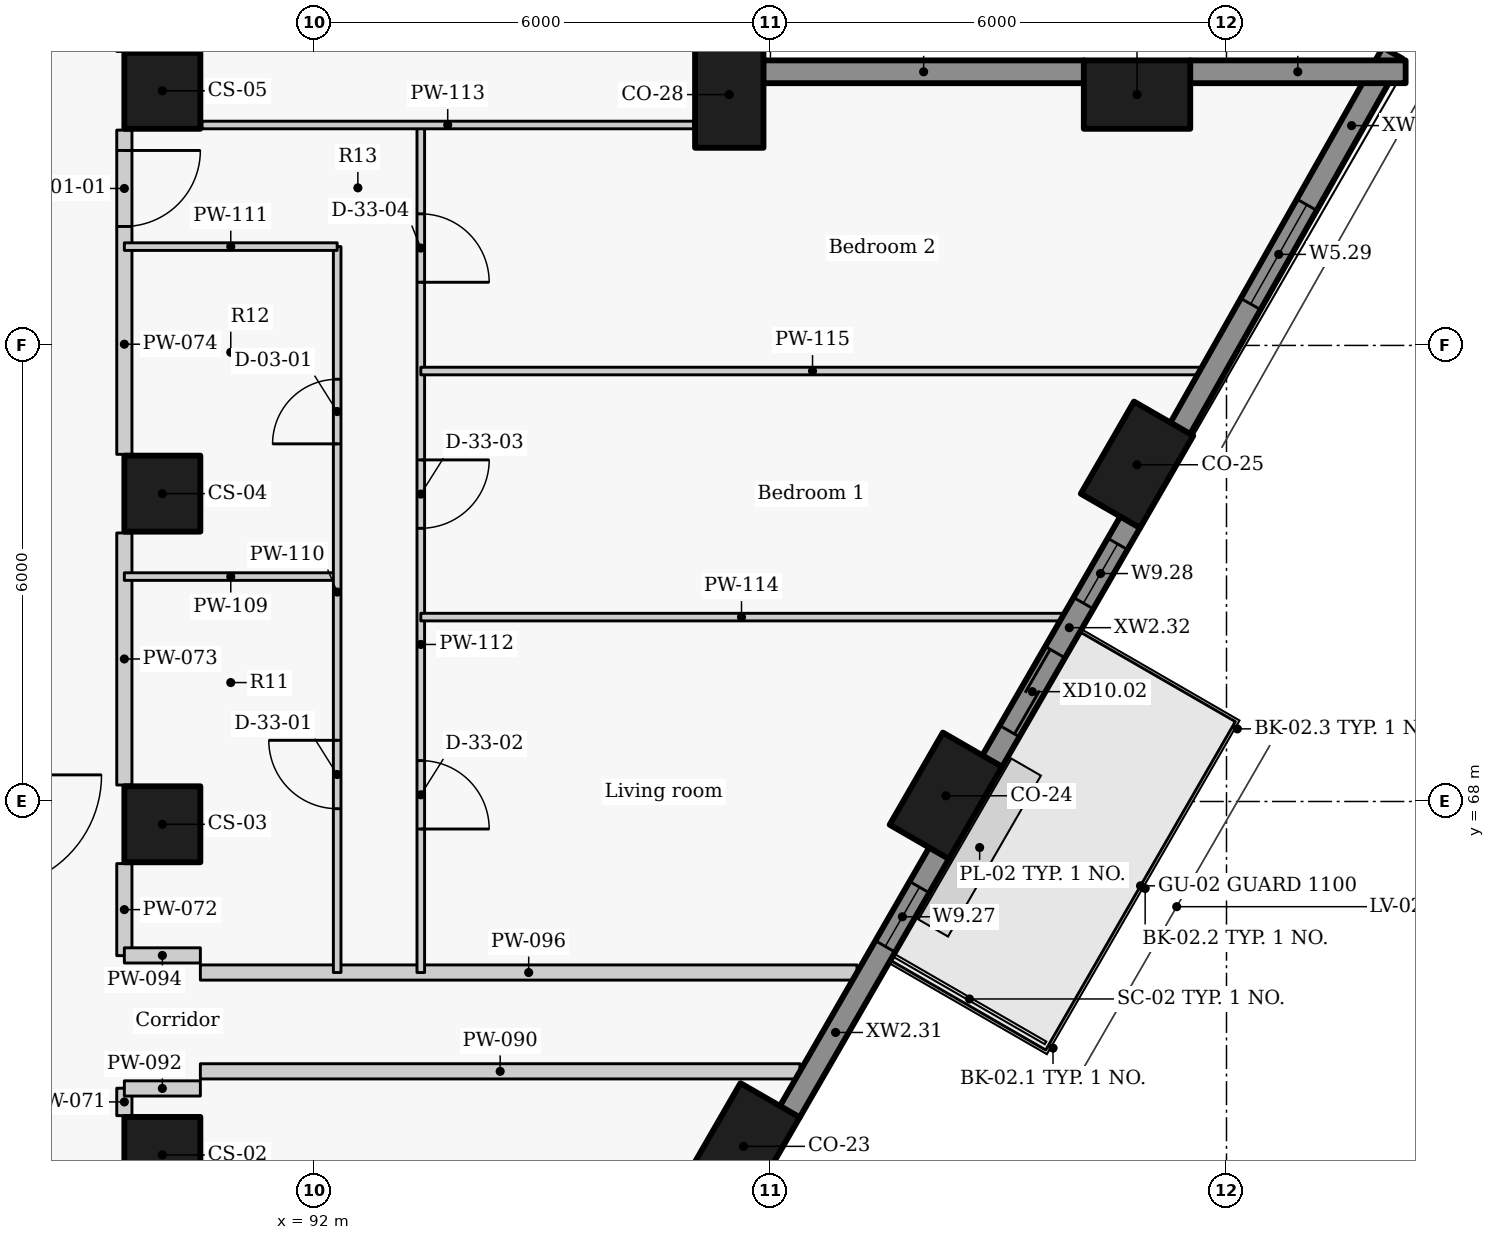
"""IFC4 building model, lengths in metres.
Left out: names, types, materials, properties, quantities, classifications, styles, units other than length and angle.
Written with IfcOpenShell. Run it as: python <this file> out.ifc"""

import sys

from ifc_helpers import new_model, si_unit, direction, frame, frame_2d, origin, origin_2d, place, context, subcontext, project, spatial, rectangle, extrude, element, fill, save


model = new_model("IFC4")
c1 = context("Model", 3, precision=1e-05, world=origin(), true_north=direction((0.0, 1.0)))
c2 = subcontext(c1, "Body", "Model", "MODEL_VIEW")
j1 = project(units=[si_unit("LENGTHUNIT", "METRE"), si_unit("PLANEANGLEUNIT", "RADIAN")], contexts=[c1])
p1 = place(None, origin())
s1 = spatial("IfcSite", under=j1, at=p1, CompositionType="ELEMENT")
p2 = place(p1, origin())
s2 = spatial("IfcBuilding", under=s1, at=p2, CompositionType="ELEMENT")
p3 = place(p2, frame((0.0, 0.0, 107.4)))
s3 = spatial("IfcBuildingStorey", under=s2, at=p3, CompositionType="ELEMENT", Elevation=107.4)
for number, where, z_axis, x_axis in (
    (1, (97.646, 63.463, 0.0), (0.0, 0.0, 1.0), (0.5, 0.866, 0.0)),
    (2, (100.308, 68.075, 0.0), (0.0, 0.0, 1.0), (0.5, 0.866, 0.0)),
    (3, (102.823, 72.43, 0.0), (0.0, 0.0, 1.0), (0.5, 0.866, 0.0)),
    (4, (102.823, 77.3, 0.0), (0.0, 0.0, 1.0), (-1.0, 0.0, 0.0)),
    (5, (97.458, 77.3, 0.0), (0.0, 0.0, 1.0), (0.0, 1.0, 0.0)),
):
    element("IfcColumn", number, at=place(p3, frame(where, z_axis=z_axis, x_axis=x_axis)), inside=s3, PredefinedType="COLUMN", context=c2, shape_type="SweptSolid", body=[
        extrude(rectangle(XDim=1.4, YDim=0.9, at=origin_2d()), origin(), (0.0, 0.0, 1.0), 3.3),
    ])
for number, where, z_axis, x_axis in (
    (6, (90.0, 63.35, 0.0), (0.0, 0.0, 1.0), (0.0, 1.0, 0.0)),
    (7, (90.0, 67.7, 0.0), (0.0, 0.0, 1.0), (0.0, 1.0, 0.0)),
    (8, (90.0, 72.05, 0.0), (0.0, 0.0, 1.0), (0.0, 1.0, 0.0)),
    (9, (90.0, 77.35, 0.0), (0.0, 0.0, 1.0), (0.0, 1.0, 0.0)),
):
    element("IfcColumn", number, at=place(p3, frame(where, z_axis=z_axis, x_axis=x_axis)), inside=s3, PredefinedType="COLUMN", context=c2, shape_type="SweptSolid", body=[
        extrude(rectangle(XDim=1.0, YDim=1.0, at=origin_2d()), origin(), (0.0, 0.0, 1.0), 3.3),
    ])
p4 = place(p3, frame((98.253, 63.916, 0.0), z_axis=(0.0, 0.0, 1.0), x_axis=(0.499957037901, 0.866050206543, 0.0)))
e10 = element("IfcWall", 10, at=p4, inside=s3, PredefinedType="SOLIDWALL", context=c2, shape_type="SweptSolid", body=[
    extrude(rectangle(XDim=3.934, YDim=0.3, at=frame_2d((1.967, 0.0))), origin(), (0.0, 0.0, 1.0), 2.425),
])
p5 = place(p4, frame((2.515, 0.0, 0.9)))
e11 = element("IfcOpeningElement", 11, at=p5, cuts=e10, PredefinedType="OPENING", context=c2, shape_type="SweptSolid", body=[
    extrude(rectangle(XDim=0.9, YDim=1.1, at=frame_2d((0.45, 0.55))), frame((0.0, 0.16, 0.0), z_axis=(0.0, -1.0, 0.0), x_axis=(1.0, 0.0, 0.0)), (0.0, 0.0, 1.0), 0.32),
])
p6 = place(p3, frame((100.916, 68.528, 0.0), z_axis=(0.0, 0.0, 1.0), x_axis=(0.500009139881, 0.866020126807, 0.0)))
e12 = element("IfcWall", 12, at=p6, inside=s3, PredefinedType="SOLIDWALL", context=c2, shape_type="SweptSolid", body=[
    extrude(rectangle(XDim=3.637, YDim=0.3, at=frame_2d((1.818, 0.0))), origin(), (0.0, 0.0, 1.0), 2.425),
])
p7 = place(p6, frame((0.458, 0.0, 0.0)))
e13 = element("IfcOpeningElement", 13, at=p7, cuts=e12, PredefinedType="OPENING", context=c2, shape_type="SweptSolid", body=[
    extrude(rectangle(XDim=1.2, YDim=2.0, at=frame_2d((0.6, 1.0))), frame((0.0, 0.16, 0.0), z_axis=(0.0, -1.0, 0.0), x_axis=(1.0, 0.0, 0.0)), (0.0, 0.0, 1.0), 0.32),
])
p8 = place(p6, frame((2.403, 0.0, 0.9)))
e14 = element("IfcOpeningElement", 14, at=p8, cuts=e12, PredefinedType="OPENING", context=c2, shape_type="SweptSolid", body=[
    extrude(rectangle(XDim=0.9, YDim=1.1, at=frame_2d((0.45, 0.55))), frame((0.0, 0.16, 0.0), z_axis=(0.0, -1.0, 0.0), x_axis=(1.0, 0.0, 0.0)), (0.0, 0.0, 1.0), 0.32),
])
p9 = place(p3, frame((103.391, 72.906, 0.0), z_axis=(0.0, 0.0, 1.0), x_axis=(0.492456858874, 0.870336855561, 0.0)))
e15 = element("IfcWall", 15, at=p9, inside=s3, PredefinedType="SOLIDWALL", context=c2, shape_type="SweptSolid", body=[
    extrude(rectangle(XDim=5.677, YDim=0.3, at=frame_2d((2.838, 0.0))), origin(), (0.0, 0.0, 1.0), 2.425),
])
p10 = place(p9, frame((1.883, 0.0, 0.9)))
e16 = element("IfcOpeningElement", 16, at=p10, cuts=e15, PredefinedType="OPENING", context=c2, shape_type="SweptSolid", body=[
    extrude(rectangle(XDim=1.5, YDim=1.1, at=frame_2d((0.75, 0.55))), frame((0.0, 0.16, 0.0), z_axis=(0.0, -1.0, 0.0), x_axis=(1.0, 0.0, 0.0)), (0.0, 0.0, 1.0), 0.32),
])
p11 = place(p3, frame((106.357, 77.6, 0.0), z_axis=(0.0, 0.0, 1.0), x_axis=(-1.0, 0.0, 0.0)))
e17 = element("IfcWall", 17, at=p11, inside=s3, PredefinedType="SOLIDWALL", context=c2, shape_type="SweptSolid", body=[
    extrude(rectangle(XDim=2.838, YDim=0.3, at=frame_2d((1.419, 0.0))), origin(), (0.0, 0.0, 1.0), 2.425),
])
p12 = place(p3, frame((102.127, 77.6, 0.0), z_axis=(0.0, 0.0, 1.0), x_axis=(-1.0, 0.0, 0.0)))
e18 = element("IfcWall", 18, at=p12, inside=s3, PredefinedType="SOLIDWALL", context=c2, shape_type="SweptSolid", body=[
    extrude(rectangle(XDim=4.223, YDim=0.3, at=frame_2d((2.111, 0.0))), origin(), (0.0, 0.0, 1.0), 2.425),
])
p13 = place(p3, frame((89.5, 63.867, 0.0), z_axis=(0.0, 0.0, 1.0), x_axis=(0.0, 1.0, 0.0)))
e19 = element("IfcWall", 19, at=p13, inside=s3, PredefinedType="PARTITIONING", context=c2, shape_type="SweptSolid", body=[
    extrude(rectangle(XDim=0.361, YDim=0.2, at=frame_2d((0.181, 0.0))), origin(), (0.0, 0.0, 1.0), 3.025),
])
p14 = place(p3, frame((89.5, 65.972, 0.0), z_axis=(0.0, 0.0, 1.0), x_axis=(0.0, 1.0, 0.0)))
e20 = element("IfcWall", 20, at=p14, inside=s3, PredefinedType="PARTITIONING", context=c2, shape_type="SweptSolid", body=[
    extrude(rectangle(XDim=1.211, YDim=0.2, at=frame_2d((0.605, 0.0))), origin(), (0.0, 0.0, 1.0), 3.025),
])
p15 = place(p3, frame((89.5, 68.217, 0.0), z_axis=(0.0, 0.0, 1.0), x_axis=(0.0, 1.0, 0.0)))
e21 = element("IfcWall", 21, at=p15, inside=s3, PredefinedType="PARTITIONING", context=c2, shape_type="SweptSolid", body=[
    extrude(rectangle(XDim=3.316, YDim=0.2, at=frame_2d((1.658, 0.0))), origin(), (0.0, 0.0, 1.0), 3.025),
])
p16 = place(p3, frame((89.5, 76.833, 0.0), z_axis=(0.0, 0.0, 1.0), x_axis=(0.0, -1.0, 0.0)))
e22 = element("IfcWall", 22, at=p16, inside=s3, PredefinedType="PARTITIONING", context=c2, shape_type="SweptSolid", body=[
    extrude(rectangle(XDim=4.266, YDim=0.2, at=frame_2d((2.133, 0.0))), origin(), (0.0, 0.0, 1.0), 3.025),
])
p17 = place(p16, frame((0.268, 0.0, 0.0)))
e23 = element("IfcOpeningElement", 23, at=p17, cuts=e22, PredefinedType="OPENING", context=c2, shape_type="SweptSolid", body=[
    extrude(rectangle(XDim=1.0, YDim=2.1, at=frame_2d((0.5, 1.05))), frame((0.0, 0.11, 0.0), z_axis=(0.0, -1.0, 0.0), x_axis=(1.0, 0.0, 0.0)), (0.0, 0.0, 1.0), 0.22),
])
p18 = place(p3, frame((90.5, 64.45, 0.0), z_axis=(0.0, 0.0, 1.0), x_axis=(1.0, 0.0, 0.0)))
e24 = element("IfcWall", 24, at=p18, inside=s3, PredefinedType="PARTITIONING", context=c2, shape_type="SweptSolid", body=[
    extrude(rectangle(XDim=7.889, YDim=0.2, at=frame_2d((3.944, 0.0))), origin(), (0.0, 0.0, 1.0), 2.405),
])
for number, where, z_axis, x_axis in (
    (25, (89.5, 64.225, 0.0), (0.0, 0.0, 1.0), (1.0, 0.0, 0.0)),
    (26, (89.5, 65.975, 0.0), (0.0, 0.0, 1.0), (1.0, 0.0, 0.0)),
):
    element("IfcWall", number, at=place(p3, frame(where, z_axis=z_axis, x_axis=x_axis)), inside=s3, PredefinedType="PARTITIONING", context=c2, shape_type="SweptSolid", body=[
        extrude(rectangle(XDim=1.0, YDim=0.2, at=frame_2d((0.5, 0.0))), origin(), (0.0, 0.0, 1.0), 2.505),
    ])
p19 = place(p3, frame((90.5, 65.75, 0.0), z_axis=(0.0, 0.0, 1.0), x_axis=(1.0, 0.0, 0.0)))
e27 = element("IfcWall", 27, at=p19, inside=s3, PredefinedType="PARTITIONING", context=c2, shape_type="SweptSolid", body=[
    extrude(rectangle(XDim=8.639, YDim=0.2, at=frame_2d((4.32, 0.0))), origin(), (0.0, 0.0, 1.0), 2.405),
])
p20 = place(p3, frame((89.5, 70.959, 0.0), z_axis=(0.0, 0.0, 1.0), x_axis=(1.0, 0.0, 0.0)))
e28 = element("IfcWall", 28, at=p20, inside=s3, PredefinedType="PARTITIONING", context=c2, shape_type="SweptSolid", body=[
    extrude(rectangle(XDim=2.8, YDim=0.1, at=frame_2d((1.4, 0.0))), origin(), (0.0, 0.0, 1.0), 2.505),
])
p21 = place(p3, frame((92.3, 65.75, 0.0), z_axis=(0.0, 0.0, 1.0), x_axis=(0.0, 1.0, 0.0)))
e29 = element("IfcWall", 29, at=p21, inside=s3, PredefinedType="PARTITIONING", context=c2, shape_type="SweptSolid", body=[
    extrude(rectangle(XDim=9.55, YDim=0.1, at=frame_2d((4.775, 0.0))), origin(), (0.0, 0.0, 1.0), 3.025),
])
p22 = place(p21, frame((2.155, 0.0, 0.0)))
e30 = element("IfcOpeningElement", 30, at=p22, cuts=e29, PredefinedType="OPENING", context=c2, shape_type="SweptSolid", body=[
    extrude(rectangle(XDim=0.9, YDim=2.1, at=frame_2d((0.45, 1.05))), frame((0.0, 0.06, 0.0), z_axis=(0.0, -1.0, 0.0), x_axis=(1.0, 0.0, 0.0)), (0.0, 0.0, 1.0), 0.12),
])
p23 = place(p21, frame((6.955, 0.0, 0.0)))
e31 = element("IfcOpeningElement", 31, at=p23, cuts=e29, PredefinedType="OPENING", context=c2, shape_type="SweptSolid", body=[
    extrude(rectangle(XDim=0.85, YDim=2.1, at=frame_2d((0.425, 1.05))), frame((0.0, 0.06, 0.0), z_axis=(0.0, -1.0, 0.0), x_axis=(1.0, 0.0, 0.0)), (0.0, 0.0, 1.0), 0.12),
])
p24 = place(p3, frame((89.5, 75.3, 0.0), z_axis=(0.0, 0.0, 1.0), x_axis=(1.0, 0.0, 0.0)))
e32 = element("IfcWall", 32, at=p24, inside=s3, PredefinedType="PARTITIONING", context=c2, shape_type="SweptSolid", body=[
    extrude(rectangle(XDim=2.8, YDim=0.1, at=frame_2d((1.4, 0.0))), origin(), (0.0, 0.0, 1.0), 2.505),
])
p25 = place(p3, frame((93.4, 76.9, 0.0), z_axis=(0.0, 0.0, 1.0), x_axis=(0.0, -1.0, 0.0)))
e33 = element("IfcWall", 33, at=p25, inside=s3, PredefinedType="PARTITIONING", context=c2, shape_type="SweptSolid", body=[
    extrude(rectangle(XDim=11.15, YDim=0.1, at=frame_2d((5.575, 0.0))), origin(), (0.0, 0.0, 1.0), 3.025),
])
p26 = place(p25, frame((8.362, 0.0, 0.0)))
e34 = element("IfcOpeningElement", 34, at=p26, cuts=e33, PredefinedType="OPENING", context=c2, shape_type="SweptSolid", body=[
    extrude(rectangle(XDim=0.9, YDim=2.1, at=frame_2d((0.45, 1.05))), frame((0.0, 0.06, 0.0), z_axis=(0.0, -1.0, 0.0), x_axis=(1.0, 0.0, 0.0)), (0.0, 0.0, 1.0), 0.12),
])
p27 = place(p25, frame((4.406, 0.0, 0.0)))
e35 = element("IfcOpeningElement", 35, at=p27, cuts=e33, PredefinedType="OPENING", context=c2, shape_type="SweptSolid", body=[
    extrude(rectangle(XDim=0.9, YDim=2.1, at=frame_2d((0.45, 1.05))), frame((0.0, 0.06, 0.0), z_axis=(0.0, -1.0, 0.0), x_axis=(1.0, 0.0, 0.0)), (0.0, 0.0, 1.0), 0.12),
])
p28 = place(p25, frame((1.169, 0.0, 0.0)))
e36 = element("IfcOpeningElement", 36, at=p28, cuts=e33, PredefinedType="OPENING", context=c2, shape_type="SweptSolid", body=[
    extrude(rectangle(XDim=0.9, YDim=2.1, at=frame_2d((0.45, 1.05))), frame((0.0, 0.06, 0.0), z_axis=(0.0, -1.0, 0.0), x_axis=(1.0, 0.0, 0.0)), (0.0, 0.0, 1.0), 0.12),
])
p29 = place(p3, frame((90.52, 76.9, 0.0), z_axis=(0.0, 0.0, 1.0), x_axis=(1.0, 0.0, 0.0)))
e37 = element("IfcWall", 37, at=p29, inside=s3, PredefinedType="PARTITIONING", context=c2, shape_type="SweptSolid", body=[
    extrude(rectangle(XDim=6.468, YDim=0.1, at=frame_2d((3.234, 0.0))), origin(), (0.0, 0.0, 1.0), 3.025),
])
p30 = place(p3, frame((93.4, 70.426, 0.0), z_axis=(0.0, 0.0, 1.0), x_axis=(1.0, 0.0, 0.0)))
e38 = element("IfcWall", 38, at=p30, inside=s3, PredefinedType="PARTITIONING", context=c2, shape_type="SweptSolid", body=[
    extrude(rectangle(XDim=8.439, YDim=0.1, at=frame_2d((4.219, 0.0))), origin(), (0.0, 0.0, 1.0), 2.405),
])
p31 = place(p3, frame((93.4, 73.663, 0.0), z_axis=(0.0, 0.0, 1.0), x_axis=(1.0, 0.0, 0.0)))
e39 = element("IfcWall", 39, at=p31, inside=s3, PredefinedType="PARTITIONING", context=c2, shape_type="SweptSolid", body=[
    extrude(rectangle(XDim=10.308, YDim=0.1, at=frame_2d((5.154, 0.0))), origin(), (0.0, 0.0, 1.0), 2.405),
])
p32 = place(p5, origin())
e40 = element("IfcWindow", 40, at=p32, inside=s3, PartitioningType="SINGLE_PANEL", PredefinedType="WINDOW", context=c2, shape_type="SweptSolid", body=[
    extrude(rectangle(XDim=0.9, YDim=1.1, at=frame_2d((0.45, 0.55))), frame((0.0, 0.03, 0.0), z_axis=(0.0, -1.0, 0.0), x_axis=(1.0, 0.0, 0.0)), (0.0, 0.0, 1.0), 0.06),
])
fill(e11, e40)
p33 = place(p7, origin())
e41 = element("IfcDoor", 41, at=p33, inside=s3, OperationType="SLIDING_TO_LEFT", PredefinedType="DOOR", context=c2, shape_type="SweptSolid", body=[
    extrude(rectangle(XDim=1.2, YDim=2.0, at=frame_2d((0.6, 1.0))), frame((0.0, 0.025, 0.0), z_axis=(0.0, -1.0, 0.0), x_axis=(1.0, 0.0, 0.0)), (0.0, 0.0, 1.0), 0.05),
])
fill(e13, e41)
p34 = place(p8, origin())
e42 = element("IfcWindow", 42, at=p34, inside=s3, PartitioningType="SINGLE_PANEL", PredefinedType="WINDOW", context=c2, shape_type="SweptSolid", body=[
    extrude(rectangle(XDim=0.9, YDim=1.1, at=frame_2d((0.45, 0.55))), frame((0.0, 0.03, 0.0), z_axis=(0.0, -1.0, 0.0), x_axis=(1.0, 0.0, 0.0)), (0.0, 0.0, 1.0), 0.06),
])
fill(e14, e42)
p35 = place(p10, origin())
e43 = element("IfcWindow", 43, at=p35, inside=s3, PartitioningType="SINGLE_PANEL", PredefinedType="WINDOW", context=c2, shape_type="SweptSolid", body=[
    extrude(rectangle(XDim=1.5, YDim=1.1, at=frame_2d((0.75, 0.55))), frame((0.0, 0.03, 0.0), z_axis=(0.0, -1.0, 0.0), x_axis=(1.0, 0.0, 0.0)), (0.0, 0.0, 1.0), 0.06),
])
fill(e16, e43)
p36 = place(p17, origin())
e44 = element("IfcDoor", 44, at=p36, inside=s3, OperationType="SINGLE_SWING_LEFT", PredefinedType="DOOR", context=c2, shape_type="SweptSolid", body=[
    extrude(rectangle(XDim=1.0, YDim=2.1, at=frame_2d((0.5, 1.05))), frame((0.0, 0.025, 0.0), z_axis=(0.0, -1.0, 0.0), x_axis=(1.0, 0.0, 0.0)), (0.0, 0.0, 1.0), 0.05),
])
fill(e23, e44)
p37 = place(p22, origin())
e45 = element("IfcDoor", 45, at=p37, inside=s3, OperationType="SINGLE_SWING_RIGHT", PredefinedType="DOOR", context=c2, shape_type="SweptSolid", body=[
    extrude(rectangle(XDim=0.9, YDim=2.1, at=frame_2d((0.45, 1.05))), frame((0.0, 0.025, 0.0), z_axis=(0.0, -1.0, 0.0), x_axis=(1.0, 0.0, 0.0)), (0.0, 0.0, 1.0), 0.05),
])
fill(e30, e45)
p38 = place(p23, origin())
e46 = element("IfcDoor", 46, at=p38, inside=s3, OperationType="SINGLE_SWING_LEFT", PredefinedType="DOOR", context=c2, shape_type="SweptSolid", body=[
    extrude(rectangle(XDim=0.85, YDim=2.1, at=frame_2d((0.425, 1.05))), frame((0.0, 0.025, 0.0), z_axis=(0.0, -1.0, 0.0), x_axis=(1.0, 0.0, 0.0)), (0.0, 0.0, 1.0), 0.05),
])
fill(e31, e46)
p39 = place(p26, origin())
e47 = element("IfcDoor", 47, at=p39, inside=s3, OperationType="SINGLE_SWING_RIGHT", PredefinedType="DOOR", context=c2, shape_type="SweptSolid", body=[
    extrude(rectangle(XDim=0.9, YDim=2.1, at=frame_2d((0.45, 1.05))), frame((0.0, 0.025, 0.0), z_axis=(0.0, -1.0, 0.0), x_axis=(1.0, 0.0, 0.0)), (0.0, 0.0, 1.0), 0.05),
])
fill(e34, e47)
p40 = place(p27, origin())
e48 = element("IfcDoor", 48, at=p40, inside=s3, OperationType="SINGLE_SWING_LEFT", PredefinedType="DOOR", context=c2, shape_type="SweptSolid", body=[
    extrude(rectangle(XDim=0.9, YDim=2.1, at=frame_2d((0.45, 1.05))), frame((0.0, 0.025, 0.0), z_axis=(0.0, -1.0, 0.0), x_axis=(1.0, 0.0, 0.0)), (0.0, 0.0, 1.0), 0.05),
])
fill(e35, e48)
p41 = place(p28, origin())
e49 = element("IfcDoor", 49, at=p41, inside=s3, OperationType="SINGLE_SWING_RIGHT", PredefinedType="DOOR", context=c2, shape_type="SweptSolid", body=[
    extrude(rectangle(XDim=0.9, YDim=2.1, at=frame_2d((0.45, 1.05))), frame((0.0, 0.025, 0.0), z_axis=(0.0, -1.0, 0.0), x_axis=(1.0, 0.0, 0.0)), (0.0, 0.0, 1.0), 0.05),
])
fill(e36, e49)
save(model, sys.argv[1])
